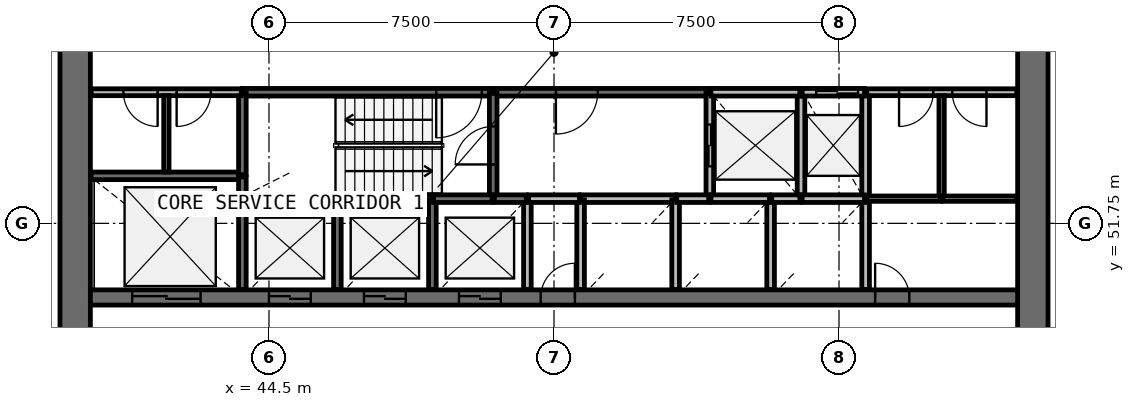
"""IFC4 building model, lengths in metres.
Left out: names, types, materials, properties, quantities, classifications, styles, units other than length and angle.
Written with IfcOpenShell. Run it as: python <this file> out.ifc"""

import sys

from ifc_helpers import new_model, si_unit, direction, frame, frame_2d, origin, place, context, subcontext, project, spatial, rectangle, extrude, source, transform, mapped, element, fill, save


model = new_model("IFC4")
c1 = context("Model", 3, precision=1e-05, world=origin(), true_north=direction((0.0, 1.0)))
c2 = subcontext(c1, "Body", "Model", "MODEL_VIEW")
j1 = project(units=[si_unit("LENGTHUNIT", "METRE"), si_unit("PLANEANGLEUNIT", "RADIAN")], contexts=[c1])
p1 = place(None, origin())
s1 = spatial("IfcSite", under=j1, at=p1, CompositionType="ELEMENT")
p2 = place(p1, origin())
s2 = spatial("IfcBuilding", under=s1, at=p2, CompositionType="ELEMENT")
p3 = place(p2, frame((0.0, 0.0, 120.8)))
s3 = spatial("IfcBuildingStorey", under=s2, at=p3, CompositionType="ELEMENT", Elevation=120.8)
p4 = place(p3, frame((64.6, 38.0, 0.0), z_axis=(0.0, 0.0, 1.0), x_axis=(0.0, 1.0, 0.0)))
e1 = element("IfcWall", 1, at=p4, inside=s3, PredefinedType="SHEAR", context=c2, shape_type="SweptSolid", body=[
    extrude(rectangle(XDim=20.0, YDim=0.8, at=frame_2d((10.0, 0.0))), origin(), (0.0, 0.0, 1.0), 4.1),
])
p5 = place(p4, frame((9.1, 0.0, 0.0)))
e2 = element("IfcOpeningElement", 2, at=p5, cuts=e1, PredefinedType="OPENING", context=c2, shape_type="SweptSolid", body=[
    extrude(rectangle(XDim=1.8, YDim=2.1, at=frame_2d((0.9, 1.05))), frame((0.0, 0.41, 0.0), z_axis=(0.0, -1.0, 0.0), x_axis=(1.0, 0.0, 0.0)), (0.0, 0.0, 1.0), 0.82),
])
p6 = place(p3, frame((39.4, 58.0, 0.0), z_axis=(0.0, 0.0, 1.0), x_axis=(0.0, -1.0, 0.0)))
e3 = element("IfcWall", 3, at=p6, inside=s3, PredefinedType="SHEAR", context=c2, shape_type="SweptSolid", body=[
    extrude(rectangle(XDim=20.0, YDim=0.8, at=frame_2d((10.0, 0.0))), origin(), (0.0, 0.0, 1.0), 4.1),
])
p7 = place(p6, frame((9.1, 0.0, 0.0)))
e4 = element("IfcOpeningElement", 4, at=p7, cuts=e3, PredefinedType="OPENING", context=c2, shape_type="SweptSolid", body=[
    extrude(rectangle(XDim=1.8, YDim=2.1, at=frame_2d((0.9, 1.05))), frame((0.0, 0.41, 0.0), z_axis=(0.0, -1.0, 0.0), x_axis=(1.0, 0.0, 0.0)), (0.0, 0.0, 1.0), 0.82),
])
p8 = place(p3, frame((39.8, 49.8, 0.0), z_axis=(0.0, 0.0, 1.0), x_axis=(1.0, 0.0, 0.0)))
e5 = element("IfcWall", 5, at=p8, inside=s3, PredefinedType="SHEAR", context=c2, shape_type="SweptSolid", body=[
    extrude(rectangle(XDim=24.4, YDim=0.4, at=frame_2d((12.2, 0.0))), origin(), (0.0, 0.0, 1.0), 4.1),
])
p9 = place(p8, frame((4.7, 0.0, 0.0)))
e6 = element("IfcOpeningElement", 6, at=p9, cuts=e5, PredefinedType="OPENING", context=c2, shape_type="SweptSolid", body=[
    extrude(rectangle(XDim=1.1, YDim=2.1, at=frame_2d((0.55, 1.05))), frame((0.0, 0.21, 0.0), z_axis=(0.0, -1.0, 0.0), x_axis=(1.0, 0.0, 0.0)), (0.0, 0.0, 1.0), 0.42),
])
p10 = place(p8, frame((7.2, 0.0, 0.0)))
e7 = element("IfcOpeningElement", 7, at=p10, cuts=e5, PredefinedType="OPENING", context=c2, shape_type="SweptSolid", body=[
    extrude(rectangle(XDim=1.1, YDim=2.1, at=frame_2d((0.55, 1.05))), frame((0.0, 0.21, 0.0), z_axis=(0.0, -1.0, 0.0), x_axis=(1.0, 0.0, 0.0)), (0.0, 0.0, 1.0), 0.42),
])
p11 = place(p8, frame((9.7, 0.0, 0.0)))
e8 = element("IfcOpeningElement", 8, at=p11, cuts=e5, PredefinedType="OPENING", context=c2, shape_type="SweptSolid", body=[
    extrude(rectangle(XDim=1.1, YDim=2.1, at=frame_2d((0.55, 1.05))), frame((0.0, 0.21, 0.0), z_axis=(0.0, -1.0, 0.0), x_axis=(1.0, 0.0, 0.0)), (0.0, 0.0, 1.0), 0.42),
])
p12 = place(p8, frame((1.1, 0.0, 0.0)))
e9 = element("IfcOpeningElement", 9, at=p12, cuts=e5, PredefinedType="OPENING", context=c2, shape_type="SweptSolid", body=[
    extrude(rectangle(XDim=1.8, YDim=2.4, at=frame_2d((0.9, 1.2))), frame((0.0, 0.21, 0.0), z_axis=(0.0, -1.0, 0.0), x_axis=(1.0, 0.0, 0.0)), (0.0, 0.0, 1.0), 0.42),
])
p13 = place(p8, frame((20.65, 0.0, 0.0)))
e10 = element("IfcOpeningElement", 10, at=p13, cuts=e5, PredefinedType="OPENING", context=c2, shape_type="SweptSolid", body=[
    extrude(rectangle(XDim=0.9, YDim=2.1, at=frame_2d((0.45, 1.05))), frame((0.0, 0.21, 0.0), z_axis=(0.0, -1.0, 0.0), x_axis=(1.0, 0.0, 0.0)), (0.0, 0.0, 1.0), 0.42),
])
p14 = place(p8, frame((11.85, 0.0, 0.0)))
e11 = element("IfcOpeningElement", 11, at=p14, cuts=e5, PredefinedType="OPENING", context=c2, shape_type="SweptSolid", body=[
    extrude(rectangle(XDim=0.9, YDim=2.1, at=frame_2d((0.45, 1.05))), frame((0.0, 0.21, 0.0), z_axis=(0.0, -1.0, 0.0), x_axis=(1.0, 0.0, 0.0)), (0.0, 0.0, 1.0), 0.42),
])
p15 = place(p3, frame((50.4, 55.2, 0.0), z_axis=(0.0, 0.0, 1.0), x_axis=(-1.0, 0.0, 0.0)))
e12 = element("IfcWall", 12, at=p15, inside=s3, PredefinedType="SOLIDWALL", context=c2, shape_type="SweptSolid", body=[
    extrude(rectangle(XDim=6.6, YDim=0.2, at=frame_2d((3.3, 0.0))), origin(), (0.0, 0.0, 1.0), 3.7),
])
p16 = place(p15, frame((0.3, 0.0, 0.0)))
e13 = element("IfcOpeningElement", 13, at=p16, cuts=e12, PredefinedType="OPENING", context=c2, shape_type="SweptSolid", body=[
    extrude(rectangle(XDim=1.2, YDim=2.1, at=frame_2d((0.6, 1.05))), frame((0.0, 0.11, 0.0), z_axis=(0.0, -1.0, 0.0), x_axis=(1.0, 0.0, 0.0)), (0.0, 0.0, 1.0), 0.22),
])
p17 = place(p3, frame((56.1, 55.2, 0.0), z_axis=(0.0, 0.0, 1.0), x_axis=(-1.0, 0.0, 0.0)))
e14 = element("IfcWall", 14, at=p17, inside=s3, PredefinedType="SOLIDWALL", context=c2, shape_type="SweptSolid", body=[
    extrude(rectangle(XDim=5.67, YDim=0.2, at=frame_2d((2.835, 0.0))), origin(), (0.0, 0.0, 1.0), 3.7),
])
p18 = place(p17, frame((2.95, 0.0, 0.0)))
e15 = element("IfcOpeningElement", 15, at=p18, cuts=e14, PredefinedType="OPENING", context=c2, shape_type="SweptSolid", body=[
    extrude(rectangle(XDim=1.1, YDim=2.1, at=frame_2d((0.55, 1.05))), frame((0.0, 0.11, 0.0), z_axis=(0.0, -1.0, 0.0), x_axis=(1.0, 0.0, 0.0)), (0.0, 0.0, 1.0), 0.22),
])
p19 = place(p3, frame((43.8, 53.0, 0.0), z_axis=(0.0, 0.0, 1.0), x_axis=(-1.0, 0.0, 0.0)))
e16 = element("IfcWall", 16, at=p19, inside=s3, PredefinedType="SOLIDWALL", context=c2, shape_type="SweptSolid", body=[
    extrude(rectangle(XDim=3.98, YDim=0.2, at=frame_2d((1.99, 0.0))), origin(), (0.0, 0.0, 1.0), 3.7),
])
p20 = place(p3, frame((50.4, 52.4, 0.0), z_axis=(0.0, 0.0, 1.0), x_axis=(0.0, 1.0, 0.0)))
e17 = element("IfcWall", 17, at=p20, inside=s3, PredefinedType="SOLIDWALL", context=c2, shape_type="SweptSolid", body=[
    extrude(rectangle(XDim=2.77, YDim=0.2, at=frame_2d((1.385, 0.0))), origin(), (0.0, 0.0, 1.0), 3.7),
])
p21 = place(p20, frame((0.9, 0.0, 0.0)))
e18 = element("IfcOpeningElement", 18, at=p21, cuts=e17, PredefinedType="OPENING", context=c2, shape_type="SweptSolid", body=[
    extrude(rectangle(XDim=1.0, YDim=2.1, at=frame_2d((0.5, 1.05))), frame((0.0, 0.11, 0.0), z_axis=(0.0, -1.0, 0.0), x_axis=(1.0, 0.0, 0.0)), (0.0, 0.0, 1.0), 0.22),
])
p22 = place(p3, frame((56.1, 55.17, 0.0), z_axis=(0.0, 0.0, 1.0), x_axis=(0.0, -1.0, 0.0)))
e19 = element("IfcWall", 19, at=p22, inside=s3, PredefinedType="SOLIDWALL", context=c2, shape_type="SweptSolid", body=[
    extrude(rectangle(XDim=2.77, YDim=0.2, at=frame_2d((1.385, 0.0))), origin(), (0.0, 0.0, 1.0), 3.7),
])
p23 = place(p22, frame((0.82, 0.0, 0.0)))
e20 = element("IfcOpeningElement", 20, at=p23, cuts=e19, PredefinedType="OPENING", context=c2, shape_type="SweptSolid", body=[
    extrude(rectangle(XDim=1.1, YDim=2.1, at=frame_2d((0.55, 1.05))), frame((0.0, 0.11, 0.0), z_axis=(0.0, -1.0, 0.0), x_axis=(1.0, 0.0, 0.0)), (0.0, 0.0, 1.0), 0.22),
])
for number, where, z_axis, x_axis in (
    (21, (58.5, 52.4, 0.0), (0.0, 0.0, 1.0), (0.0, 1.0, 0.0)),
    (22, (60.2, 52.4, 0.0), (0.0, 0.0, 1.0), (0.0, 1.0, 0.0)),
):
    element("IfcWall", number, at=place(p3, frame(where, z_axis=z_axis, x_axis=x_axis)), inside=s3, PredefinedType="SOLIDWALL", context=c2, shape_type="SweptSolid", body=[
        extrude(rectangle(XDim=2.8, YDim=0.2, at=frame_2d((1.4, 0.0))), origin(), (0.0, 0.0, 1.0), 3.7),
    ])
p24 = place(p3, frame((46.3, 52.4, 0.0), z_axis=(0.0, 0.0, 1.0), x_axis=(-1.0, 0.0, 0.0)))
e23 = element("IfcWall", 23, at=p24, inside=s3, PredefinedType="SOLIDWALL", context=c2, shape_type="SweptSolid", body=[
    extrude(rectangle(XDim=2.5, YDim=0.2, at=frame_2d((1.25, 0.0))), origin(), (0.0, 0.0, 1.0), 3.7),
])
p25 = place(p3, frame((48.8, 52.4, 0.0), z_axis=(0.0, 0.0, 1.0), x_axis=(-1.0, 0.0, 0.0)))
e24 = element("IfcWall", 24, at=p25, inside=s3, PredefinedType="SOLIDWALL", context=c2, shape_type="SweptSolid", body=[
    extrude(rectangle(XDim=2.47, YDim=0.2, at=frame_2d((1.235, 0.0))), origin(), (0.0, 0.0, 1.0), 3.7),
])
p26 = place(p3, frame((55.2, 52.4, 0.0), z_axis=(0.0, 0.0, 1.0), x_axis=(-1.0, 0.0, 0.0)))
e25 = element("IfcWall", 25, at=p26, inside=s3, PredefinedType="SOLIDWALL", context=c2, shape_type="SweptSolid", body=[
    extrude(rectangle(XDim=2.5, YDim=0.2, at=frame_2d((1.25, 0.0))), origin(), (0.0, 0.0, 1.0), 3.7),
])
p27 = place(p3, frame((58.47, 55.2, 0.0), z_axis=(0.0, 0.0, 1.0), x_axis=(-1.0, 0.0, 0.0)))
e26 = element("IfcWall", 26, at=p27, inside=s3, PredefinedType="SOLIDWALL", context=c2, shape_type="SweptSolid", body=[
    extrude(rectangle(XDim=2.34, YDim=0.2, at=frame_2d((1.17, 0.0))), origin(), (0.0, 0.0, 1.0), 3.7),
])
for number, where, z_axis, x_axis in (
    (27, (43.8, 52.37, 0.0), (0.0, 0.0, 1.0), (0.0, -1.0, 0.0)),
    (28, (46.3, 50.01, 0.0), (0.0, 0.0, 1.0), (0.0, 1.0, 0.0)),
    (29, (48.8, 50.01, 0.0), (0.0, 0.0, 1.0), (0.0, 1.0, 0.0)),
):
    element("IfcWall", number, at=place(p3, frame(where, z_axis=z_axis, x_axis=x_axis)), inside=s3, PredefinedType="SOLIDWALL", context=c2, shape_type="SweptSolid", body=[
        extrude(rectangle(XDim=2.36, YDim=0.2, at=frame_2d((1.18, 0.0))), origin(), (0.0, 0.0, 1.0), 3.7),
    ])
p28 = place(p3, frame((51.3, 50.01, 0.0), z_axis=(0.0, 0.0, 1.0), x_axis=(0.0, 1.0, 0.0)))
e30 = element("IfcWall", 30, at=p28, inside=s3, PredefinedType="SOLIDWALL", context=c2, shape_type="SweptSolid", body=[
    extrude(rectangle(XDim=2.39, YDim=0.2, at=frame_2d((1.195, 0.0))), origin(), (0.0, 0.0, 1.0), 3.7),
])
for number, where, z_axis, x_axis in (
    (31, (52.7, 52.37, 0.0), (0.0, 0.0, 1.0), (0.0, -1.0, 0.0)),
    (32, (55.2, 50.01, 0.0), (0.0, 0.0, 1.0), (0.0, 1.0, 0.0)),
):
    element("IfcWall", number, at=place(p3, frame(where, z_axis=z_axis, x_axis=x_axis)), inside=s3, PredefinedType="SOLIDWALL", context=c2, shape_type="SweptSolid", body=[
        extrude(rectangle(XDim=2.36, YDim=0.2, at=frame_2d((1.18, 0.0))), origin(), (0.0, 0.0, 1.0), 3.7),
    ])
p29 = place(p3, frame((57.7, 50.01, 0.0), z_axis=(0.0, 0.0, 1.0), x_axis=(0.0, 1.0, 0.0)))
e33 = element("IfcWall", 33, at=p29, inside=s3, PredefinedType="SOLIDWALL", context=c2, shape_type="SweptSolid", body=[
    extrude(rectangle(XDim=2.39, YDim=0.2, at=frame_2d((1.195, 0.0))), origin(), (0.0, 0.0, 1.0), 3.7),
])
p30 = place(p3, frame((60.2, 50.01, 0.0), z_axis=(0.0, 0.0, 1.0), x_axis=(0.0, 1.0, 0.0)))
e34 = element("IfcWall", 34, at=p30, inside=s3, PredefinedType="SOLIDWALL", context=c2, shape_type="SweptSolid", body=[
    extrude(rectangle(XDim=2.36, YDim=0.2, at=frame_2d((1.18, 0.0))), origin(), (0.0, 0.0, 1.0), 3.7),
])
p31 = place(p3, frame((43.8, 55.17, 0.0), z_axis=(0.0, 0.0, 1.0), x_axis=(0.0, -1.0, 0.0)))
e35 = element("IfcWall", 35, at=p31, inside=s3, PredefinedType="SOLIDWALL", context=c2, shape_type="SweptSolid", body=[
    extrude(rectangle(XDim=2.14, YDim=0.2, at=frame_2d((1.07, 0.0))), origin(), (0.0, 0.0, 1.0), 3.7),
])
p32 = place(p3, frame((60.17, 52.4, 0.0), z_axis=(0.0, 0.0, 1.0), x_axis=(-1.0, 0.0, 0.0)))
e36 = element("IfcWall", 36, at=p32, inside=s3, PredefinedType="SOLIDWALL", context=c2, shape_type="SweptSolid", body=[
    extrude(rectangle(XDim=1.64, YDim=0.2, at=frame_2d((0.82, 0.0))), origin(), (0.0, 0.0, 1.0), 3.7),
])
p33 = place(p3, frame((60.17, 55.2, 0.0), z_axis=(0.0, 0.0, 1.0), x_axis=(-1.0, 0.0, 0.0)))
e37 = element("IfcWall", 37, at=p33, inside=s3, PredefinedType="SOLIDWALL", context=c2, shape_type="SweptSolid", body=[
    extrude(rectangle(XDim=1.64, YDim=0.2, at=frame_2d((0.82, 0.0))), origin(), (0.0, 0.0, 1.0), 3.7),
])
p34 = place(p33, frame((0.17, 0.0, 0.0)))
e38 = element("IfcOpeningElement", 38, at=p34, cuts=e37, PredefinedType="OPENING", context=c2, shape_type="SweptSolid", body=[
    extrude(rectangle(XDim=1.1, YDim=2.1, at=frame_2d((0.55, 1.05))), frame((0.0, 0.11, 0.0), z_axis=(0.0, -1.0, 0.0), x_axis=(1.0, 0.0, 0.0)), (0.0, 0.0, 1.0), 0.22),
])
for number, where, z_axis, x_axis in (
    (39, (50.37, 52.4, 0.0), (0.0, 0.0, 1.0), (-1.0, 0.0, 0.0)),
    (40, (57.67, 52.4, 0.0), (0.0, 0.0, 1.0), (-1.0, 0.0, 0.0)),
):
    element("IfcWall", number, at=place(p3, frame(where, z_axis=z_axis, x_axis=x_axis)), inside=s3, PredefinedType="SOLIDWALL", context=c2, shape_type="SweptSolid", body=[
        extrude(rectangle(XDim=1.54, YDim=0.2, at=frame_2d((0.77, 0.0))), origin(), (0.0, 0.0, 1.0), 3.7),
    ])
p35 = place(p3, frame((51.33, 52.4, 0.0), z_axis=(0.0, 0.0, 1.0), x_axis=(1.0, 0.0, 0.0)))
e41 = element("IfcWall", 41, at=p35, inside=s3, PredefinedType="SOLIDWALL", context=c2, shape_type="SweptSolid", body=[
    extrude(rectangle(XDim=1.34, YDim=0.2, at=frame_2d((0.67, 0.0))), origin(), (0.0, 0.0, 1.0), 3.7),
])
for number, where, z_axis, x_axis in (
    (42, (51.27, 52.4, 0.0), (0.0, 0.0, 1.0), (-1.0, 0.0, 0.0)),
    (43, (56.07, 52.4, 0.0), (0.0, 0.0, 1.0), (-1.0, 0.0, 0.0)),
):
    element("IfcWall", number, at=place(p3, frame(where, z_axis=z_axis, x_axis=x_axis)), inside=s3, PredefinedType="SOLIDWALL", context=c2, shape_type="SweptSolid", body=[
        extrude(rectangle(XDim=0.84, YDim=0.2, at=frame_2d((0.42, 0.0))), origin(), (0.0, 0.0, 1.0), 3.7),
    ])
p36 = place(p3, frame((58.47, 52.4, 0.0), z_axis=(0.0, 0.0, 1.0), x_axis=(-1.0, 0.0, 0.0)))
e44 = element("IfcWall", 44, at=p36, inside=s3, PredefinedType="SOLIDWALL", context=c2, shape_type="SweptSolid", body=[
    extrude(rectangle(XDim=0.74, YDim=0.2, at=frame_2d((0.37, 0.0))), origin(), (0.0, 0.0, 1.0), 3.7),
])
p37 = place(p3, frame((43.8, 52.43, 0.0), z_axis=(0.0, 0.0, 1.0), x_axis=(0.0, 1.0, 0.0)))
e45 = element("IfcWall", 45, at=p37, inside=s3, PredefinedType="SOLIDWALL", context=c2, shape_type="SweptSolid", body=[
    extrude(rectangle(XDim=0.54, YDim=0.2, at=frame_2d((0.27, 0.0))), origin(), (0.0, 0.0, 1.0), 3.7),
])
p38 = place(p3, frame((64.18, 55.2, 0.0), z_axis=(0.0, 0.0, 1.0), x_axis=(-1.0, 0.0, 0.0)))
e46 = element("IfcWall", 46, at=p38, inside=s3, PredefinedType="PARTITIONING", context=c2, shape_type="SweptSolid", body=[
    extrude(rectangle(XDim=3.95, YDim=0.18, at=frame_2d((1.975, 0.0))), origin(), (0.0, 0.0, 1.0), 3.7),
])
p39 = place(p38, frame((2.2, 0.0, 0.0)))
e47 = element("IfcOpeningElement", 47, at=p39, cuts=e46, PredefinedType="OPENING", context=c2, shape_type="SweptSolid", body=[
    extrude(rectangle(XDim=0.9, YDim=2.1, at=frame_2d((0.45, 1.05))), frame((0.0, 0.1, 0.0), z_axis=(0.0, -1.0, 0.0), x_axis=(1.0, 0.0, 0.0)), (0.0, 0.0, 1.0), 0.2),
])
p40 = place(p38, frame((0.8, 0.0, 0.0)))
e48 = element("IfcOpeningElement", 48, at=p40, cuts=e46, PredefinedType="OPENING", context=c2, shape_type="SweptSolid", body=[
    extrude(rectangle(XDim=0.9, YDim=2.1, at=frame_2d((0.45, 1.05))), frame((0.0, 0.1, 0.0), z_axis=(0.0, -1.0, 0.0), x_axis=(1.0, 0.0, 0.0)), (0.0, 0.0, 1.0), 0.2),
])
p41 = place(p3, frame((43.77, 55.2, 0.0), z_axis=(0.0, 0.0, 1.0), x_axis=(-1.0, 0.0, 0.0)))
e49 = element("IfcWall", 49, at=p41, inside=s3, PredefinedType="PARTITIONING", context=c2, shape_type="SweptSolid", body=[
    extrude(rectangle(XDim=3.95, YDim=0.18, at=frame_2d((1.975, 0.0))), origin(), (0.0, 0.0, 1.0), 3.7),
])
p42 = place(p41, frame((2.2, 0.0, 0.0)))
e50 = element("IfcOpeningElement", 50, at=p42, cuts=e49, PredefinedType="OPENING", context=c2, shape_type="SweptSolid", body=[
    extrude(rectangle(XDim=0.9, YDim=2.1, at=frame_2d((0.45, 1.05))), frame((0.0, 0.1, 0.0), z_axis=(0.0, -1.0, 0.0), x_axis=(1.0, 0.0, 0.0)), (0.0, 0.0, 1.0), 0.2),
])
p43 = place(p41, frame((0.8, 0.0, 0.0)))
e51 = element("IfcOpeningElement", 51, at=p43, cuts=e49, PredefinedType="OPENING", context=c2, shape_type="SweptSolid", body=[
    extrude(rectangle(XDim=0.9, YDim=2.1, at=frame_2d((0.45, 1.05))), frame((0.0, 0.1, 0.0), z_axis=(0.0, -1.0, 0.0), x_axis=(1.0, 0.0, 0.0)), (0.0, 0.0, 1.0), 0.2),
])
p44 = place(p3, frame((62.2, 52.4, 0.0), z_axis=(0.0, 0.0, 1.0), x_axis=(0.0, 1.0, 0.0)))
e52 = element("IfcWall", 52, at=p44, inside=s3, PredefinedType="PARTITIONING", context=c2, shape_type="SweptSolid", body=[
    extrude(rectangle(XDim=2.71, YDim=0.14, at=frame_2d((1.355, 0.0))), origin(), (0.0, 0.0, 1.0), 2.9),
])
p45 = place(p3, frame((41.8, 53.1, 0.0), z_axis=(0.0, 0.0, 1.0), x_axis=(0.0, 1.0, 0.0)))
e53 = element("IfcWall", 53, at=p45, inside=s3, PredefinedType="PARTITIONING", context=c2, shape_type="SweptSolid", body=[
    extrude(rectangle(XDim=2.01, YDim=0.14, at=frame_2d((1.005, 0.0))), origin(), (0.0, 0.0, 1.0), 2.9),
])
p46 = place(p3, frame((62.17, 52.4, 0.0), z_axis=(0.0, 0.0, 1.0), x_axis=(-1.0, 0.0, 0.0)))
e54 = element("IfcWall", 54, at=p46, inside=s3, PredefinedType="PARTITIONING", context=c2, shape_type="SweptSolid", body=[
    extrude(rectangle(XDim=1.94, YDim=0.14, at=frame_2d((0.97, 0.0))), origin(), (0.0, 0.0, 1.0), 2.9),
])
p47 = place(p3, frame((64.18, 52.4, 0.0), z_axis=(0.0, 0.0, 1.0), x_axis=(-1.0, 0.0, 0.0)))
e55 = element("IfcWall", 55, at=p47, inside=s3, PredefinedType="PARTITIONING", context=c2, shape_type="SweptSolid", body=[
    extrude(rectangle(XDim=1.95, YDim=0.14, at=frame_2d((0.975, 0.0))), origin(), (0.0, 0.0, 1.0), 2.9),
])
m1 = source(origin(), c2, "Body", "SweptSolid", [
    extrude(rectangle(XDim=1.1, YDim=2.1, at=frame_2d((0.55, 1.05))), frame((0.0, 0.025, 0.0), z_axis=(0.0, -1.0, 0.0), x_axis=(1.0, 0.0, 0.0)), (0.0, 0.0, 1.0), 0.05),
])
p48 = place(p9, origin())
e56 = element("IfcDoor", 56, at=p48, inside=s3, OperationType="DOUBLE_DOOR_SLIDING", PredefinedType="USERDEFINED", context=c2, shape_type="MappedRepresentation", body=[
    mapped(m1, transform((0.0, 0.0, 0.0), scale=1.0)),
])
fill(e6, e56)
p49 = place(p10, origin())
e57 = element("IfcDoor", 57, at=p49, inside=s3, OperationType="DOUBLE_DOOR_SLIDING", PredefinedType="USERDEFINED", context=c2, shape_type="MappedRepresentation", body=[
    mapped(m1, transform((0.0, 0.0, 0.0), scale=1.0)),
])
fill(e7, e57)
p50 = place(p11, origin())
e58 = element("IfcDoor", 58, at=p50, inside=s3, OperationType="DOUBLE_DOOR_SLIDING", PredefinedType="USERDEFINED", context=c2, shape_type="MappedRepresentation", body=[
    mapped(m1, transform((0.0, 0.0, 0.0), scale=1.0)),
])
fill(e8, e58)
p51 = place(p23, origin())
e59 = element("IfcDoor", 59, at=p51, inside=s3, OperationType="DOUBLE_DOOR_SLIDING", PredefinedType="USERDEFINED", context=c2, shape_type="MappedRepresentation", body=[
    mapped(m1, transform((0.0, 0.0, 0.0), scale=1.0)),
])
fill(e20, e59)
p52 = place(p34, origin())
e60 = element("IfcDoor", 60, at=p52, inside=s3, OperationType="DOUBLE_DOOR_SLIDING", PredefinedType="USERDEFINED", context=c2, shape_type="MappedRepresentation", body=[
    mapped(m1, transform((0.0, 0.0, 0.0), scale=1.0)),
])
fill(e38, e60)
m2 = source(origin(), c2, "Body", "SweptSolid", [
    extrude(rectangle(XDim=1.8, YDim=2.4, at=frame_2d((0.9, 1.2))), frame((0.0, 0.025, 0.0), z_axis=(0.0, -1.0, 0.0), x_axis=(1.0, 0.0, 0.0)), (0.0, 0.0, 1.0), 0.05),
])
p53 = place(p12, origin())
e61 = element("IfcDoor", 61, at=p53, inside=s3, OperationType="DOUBLE_DOOR_SLIDING", PredefinedType="USERDEFINED", context=c2, shape_type="MappedRepresentation", body=[
    mapped(m2, transform((0.0, 0.0, 0.0), scale=1.0)),
])
fill(e9, e61)
m3 = source(origin(), c2, "Body", "SweptSolid", [
    extrude(rectangle(XDim=1.2, YDim=2.1, at=frame_2d((0.6, 1.05))), frame((0.0, 0.025, 0.0), z_axis=(0.0, -1.0, 0.0), x_axis=(1.0, 0.0, 0.0)), (0.0, 0.0, 1.0), 0.05),
])
p54 = place(p16, origin())
e62 = element("IfcDoor", 62, at=p54, inside=s3, OperationType="SINGLE_SWING_RIGHT", PredefinedType="DOOR", context=c2, shape_type="MappedRepresentation", body=[
    mapped(m3, transform((0.0, 0.0, 0.0), scale=1.0)),
])
fill(e13, e62)
m4 = source(origin(), c2, "Body", "SweptSolid", [
    extrude(rectangle(XDim=1.0, YDim=2.1, at=frame_2d((0.5, 1.05))), frame((0.0, 0.025, 0.0), z_axis=(0.0, -1.0, 0.0), x_axis=(1.0, 0.0, 0.0)), (0.0, 0.0, 1.0), 0.05),
])
p55 = place(p21, origin())
e63 = element("IfcDoor", 63, at=p55, inside=s3, OperationType="SINGLE_SWING_LEFT", PredefinedType="DOOR", context=c2, shape_type="MappedRepresentation", body=[
    mapped(m4, transform((0.0, 0.0, 0.0), scale=1.0)),
])
fill(e18, e63)
m5 = source(origin(), c2, "Body", "SweptSolid", [
    extrude(rectangle(XDim=1.1, YDim=2.1, at=frame_2d((0.55, 1.05))), frame((0.0, 0.025, 0.0), z_axis=(0.0, -1.0, 0.0), x_axis=(1.0, 0.0, 0.0)), (0.0, 0.0, 1.0), 0.05),
])
p56 = place(p18, origin())
e64 = element("IfcDoor", 64, at=p56, inside=s3, OperationType="SINGLE_SWING_RIGHT", PredefinedType="DOOR", context=c2, shape_type="MappedRepresentation", body=[
    mapped(m5, transform((0.0, 0.0, 0.0), scale=1.0)),
])
fill(e15, e64)
m6 = source(origin(), c2, "Body", "SweptSolid", [
    extrude(rectangle(XDim=0.9, YDim=2.1, at=frame_2d((0.45, 1.05))), frame((0.0, 0.025, 0.0), z_axis=(0.0, -1.0, 0.0), x_axis=(1.0, 0.0, 0.0)), (0.0, 0.0, 1.0), 0.05),
])
p57 = place(p42, origin())
e65 = element("IfcDoor", 65, at=p57, inside=s3, OperationType="SINGLE_SWING_LEFT", PredefinedType="DOOR", context=c2, shape_type="MappedRepresentation", body=[
    mapped(m6, transform((0.0, 0.0, 0.0), scale=1.0)),
])
fill(e50, e65)
p58 = place(p43, origin())
e66 = element("IfcDoor", 66, at=p58, inside=s3, OperationType="SINGLE_SWING_RIGHT", PredefinedType="DOOR", context=c2, shape_type="MappedRepresentation", body=[
    mapped(m6, transform((0.0, 0.0, 0.0), scale=1.0)),
])
fill(e51, e66)
p59 = place(p13, origin())
e67 = element("IfcDoor", 67, at=p59, inside=s3, OperationType="SINGLE_SWING_LEFT", PredefinedType="DOOR", context=c2, shape_type="MappedRepresentation", body=[
    mapped(m6, transform((0.0, 0.0, 0.0), scale=1.0)),
])
fill(e10, e67)
p60 = place(p39, origin())
e68 = element("IfcDoor", 68, at=p60, inside=s3, OperationType="SINGLE_SWING_RIGHT", PredefinedType="DOOR", context=c2, shape_type="MappedRepresentation", body=[
    mapped(m6, transform((0.0, 0.0, 0.0), scale=1.0)),
])
fill(e47, e68)
p61 = place(p40, origin())
e69 = element("IfcDoor", 69, at=p61, inside=s3, OperationType="SINGLE_SWING_LEFT", PredefinedType="DOOR", context=c2, shape_type="MappedRepresentation", body=[
    mapped(m6, transform((0.0, 0.0, 0.0), scale=1.0)),
])
fill(e48, e69)
p62 = place(p14, origin())
e70 = element("IfcDoor", 70, at=p62, inside=s3, OperationType="SINGLE_SWING_RIGHT", PredefinedType="DOOR", context=c2, shape_type="MappedRepresentation", body=[
    mapped(m6, transform((0.0, 0.0, 0.0), scale=1.0)),
])
fill(e11, e70)
save(model, sys.argv[1])
